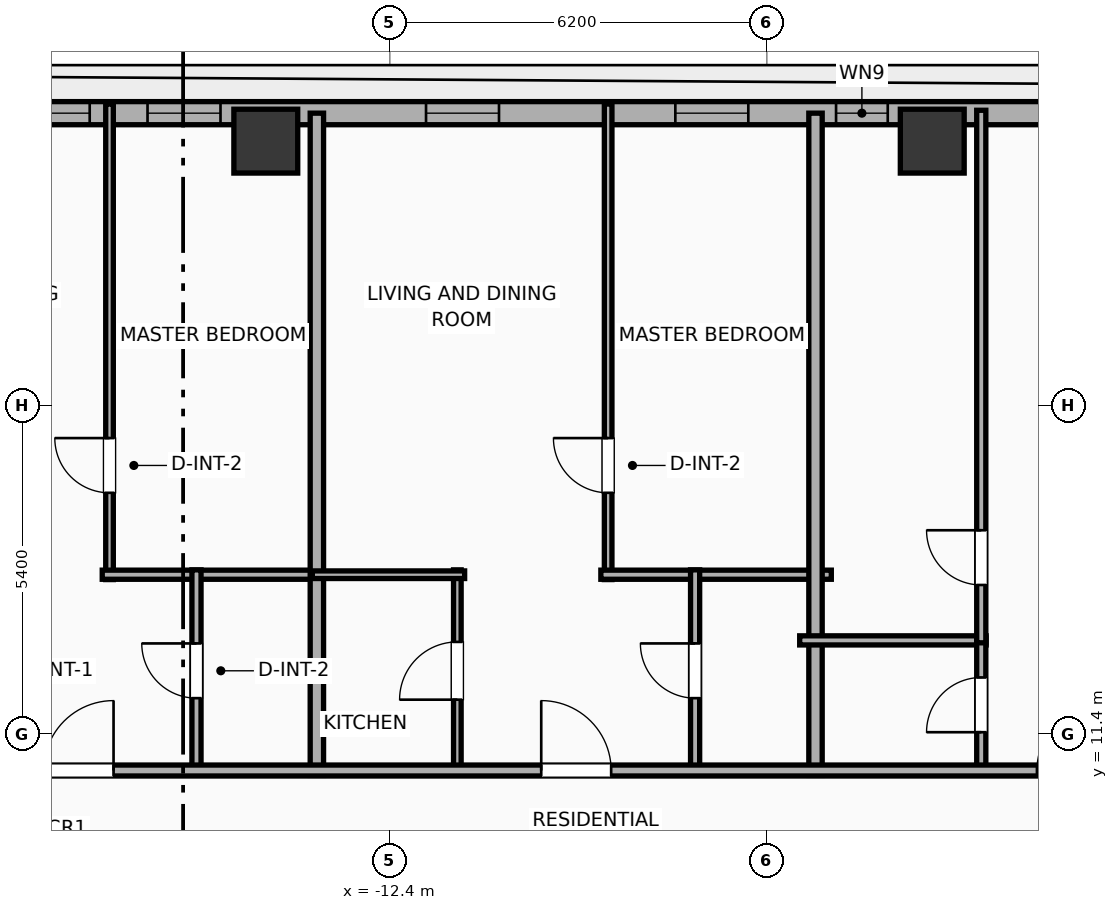
"""IFC4 building model, lengths in metres.
Left out: names, types, materials, properties, quantities, classifications, styles, units other than length and angle.
Written with IfcOpenShell. Run it as: python <this file> out.ifc"""

import sys

from ifc_helpers import new_model, si_unit, direction, frame, frame_2d, origin, origin_2d, place, context, subcontext, project, spatial, rectangle, hollow_rectangle, extrude, element, fill, save


model = new_model("IFC4")
c1 = context("Model", 3, precision=1e-05, world=origin(), true_north=direction((0.0, 1.0)))
c2 = subcontext(c1, "Body", "Model", "MODEL_VIEW")
j1 = project(units=[si_unit("LENGTHUNIT", "METRE"), si_unit("PLANEANGLEUNIT", "RADIAN")], contexts=[c1])
p1 = place(None, origin())
s1 = spatial("IfcSite", under=j1, at=p1, CompositionType="ELEMENT")
p2 = place(p1, origin())
s2 = spatial("IfcBuilding", under=s1, at=p2, CompositionType="ELEMENT")
p3 = place(p2, frame((0.0, 0.0, 85.8)))
s3 = spatial("IfcBuildingStorey", under=s2, at=p3, CompositionType="ELEMENT", Elevation=85.8)
for number, where, z_axis, x_axis in (
    (1, (-3.48, 21.15, -0.4), (0.0, 0.0, 1.0), (1.0, 0.0, 0.0)),
    (2, (-14.44, 21.15, -0.4), (0.0, 0.0, 1.0), (1.0, 0.0, 0.0)),
):
    element("IfcColumn", number, at=place(p3, frame(where, z_axis=z_axis, x_axis=x_axis)), inside=s3, PredefinedType="COLUMN", context=c2, shape_type="SweptSolid", body=[
        extrude(hollow_rectangle(XDim=1.05, YDim=1.05, WallThickness=0.036, at=origin_2d()), origin(), (0.0, 0.0, 1.0), 4.3),
    ])
p4 = place(p3, frame((-25.381, 21.61, 0.0), z_axis=(0.0, 0.0, 1.0), x_axis=(1.0, 0.0, 0.0)))
e3 = element("IfcWall", 3, at=p4, inside=s3, PredefinedType="ELEMENTEDWALL", context=c2, shape_type="SweptSolid", body=[
    extrude(rectangle(XDim=54.763, YDim=0.38, at=frame_2d((27.381, 0.0))), origin(), (0.0, 0.0, 1.0), 2.54),
])
p5 = place(p4, frame((5.645, 0.0, 0.75)))
e4 = element("IfcOpeningElement", 4, at=p5, cuts=e3, PredefinedType="OPENING", context=c2, shape_type="SweptSolid", body=[
    extrude(rectangle(XDim=2.4, YDim=1.45, at=frame_2d((1.2, 0.725))), frame((0.0, 0.2, 0.0), z_axis=(0.0, -1.0, 0.0), x_axis=(1.0, 0.0, 0.0)), (0.0, 0.0, 1.0), 0.4),
])
p6 = place(p4, frame((47.567, 0.0, 0.75)))
e5 = element("IfcOpeningElement", 5, at=p6, cuts=e3, PredefinedType="OPENING", context=c2, shape_type="SweptSolid", body=[
    extrude(rectangle(XDim=2.4, YDim=1.45, at=frame_2d((1.2, 0.725))), frame((0.0, 0.2, 0.0), z_axis=(0.0, -1.0, 0.0), x_axis=(1.0, 0.0, 0.0)), (0.0, 0.0, 1.0), 0.4),
])
p7 = place(p4, frame((1.635, 0.0, 0.55)))
e6 = element("IfcOpeningElement", 6, at=p7, cuts=e3, PredefinedType="OPENING", context=c2, shape_type="SweptSolid", body=[
    extrude(rectangle(XDim=1.2, YDim=1.15, at=frame_2d((0.6, 0.575))), frame((0.0, 0.2, 0.0), z_axis=(0.0, -1.0, 0.0), x_axis=(1.0, 0.0, 0.0)), (0.0, 0.0, 1.0), 0.4),
])
p8 = place(p4, frame((8.996, 0.0, 0.55)))
e7 = element("IfcOpeningElement", 7, at=p8, cuts=e3, PredefinedType="OPENING", context=c2, shape_type="SweptSolid", body=[
    extrude(rectangle(XDim=1.2, YDim=1.15, at=frame_2d((0.6, 0.575))), frame((0.0, 0.2, 0.0), z_axis=(0.0, -1.0, 0.0), x_axis=(1.0, 0.0, 0.0)), (0.0, 0.0, 1.0), 0.4),
])
p9 = place(p4, frame((13.576, 0.0, 0.55)))
e8 = element("IfcOpeningElement", 8, at=p9, cuts=e3, PredefinedType="OPENING", context=c2, shape_type="SweptSolid", body=[
    extrude(rectangle(XDim=1.2, YDim=1.15, at=frame_2d((0.6, 0.575))), frame((0.0, 0.2, 0.0), z_axis=(0.0, -1.0, 0.0), x_axis=(1.0, 0.0, 0.0)), (0.0, 0.0, 1.0), 0.4),
])
p10 = place(p4, frame((17.676, 0.0, 0.55)))
e9 = element("IfcOpeningElement", 9, at=p10, cuts=e3, PredefinedType="OPENING", context=c2, shape_type="SweptSolid", body=[
    extrude(rectangle(XDim=1.2, YDim=1.15, at=frame_2d((0.6, 0.575))), frame((0.0, 0.2, 0.0), z_axis=(0.0, -1.0, 0.0), x_axis=(1.0, 0.0, 0.0)), (0.0, 0.0, 1.0), 0.4),
])
p11 = place(p4, frame((20.319, 0.0, 0.55)))
e10 = element("IfcOpeningElement", 10, at=p11, cuts=e3, PredefinedType="OPENING", context=c2, shape_type="SweptSolid", body=[
    extrude(rectangle(XDim=0.85, YDim=1.15, at=frame_2d((0.425, 0.575))), frame((0.0, 0.2, 0.0), z_axis=(0.0, -1.0, 0.0), x_axis=(1.0, 0.0, 0.0)), (0.0, 0.0, 1.0), 0.4),
])
p12 = place(p4, frame((24.844, 0.0, 0.55)))
e11 = element("IfcOpeningElement", 11, at=p12, cuts=e3, PredefinedType="OPENING", context=c2, shape_type="SweptSolid", body=[
    extrude(rectangle(XDim=1.2, YDim=1.15, at=frame_2d((0.6, 0.575))), frame((0.0, 0.2, 0.0), z_axis=(0.0, -1.0, 0.0), x_axis=(1.0, 0.0, 0.0)), (0.0, 0.0, 1.0), 0.4),
])
p13 = place(p4, frame((29.976, 0.0, 0.55)))
e12 = element("IfcOpeningElement", 12, at=p13, cuts=e3, PredefinedType="OPENING", context=c2, shape_type="SweptSolid", body=[
    extrude(rectangle(XDim=1.2, YDim=1.15, at=frame_2d((0.6, 0.575))), frame((0.0, 0.2, 0.0), z_axis=(0.0, -1.0, 0.0), x_axis=(1.0, 0.0, 0.0)), (0.0, 0.0, 1.0), 0.4),
])
p14 = place(p4, frame((34.076, 0.0, 0.55)))
e13 = element("IfcOpeningElement", 13, at=p14, cuts=e3, PredefinedType="OPENING", context=c2, shape_type="SweptSolid", body=[
    extrude(rectangle(XDim=1.2, YDim=1.15, at=frame_2d((0.6, 0.575))), frame((0.0, 0.2, 0.0), z_axis=(0.0, -1.0, 0.0), x_axis=(1.0, 0.0, 0.0)), (0.0, 0.0, 1.0), 0.4),
])
p15 = place(p4, frame((38.176, 0.0, 0.55)))
e14 = element("IfcOpeningElement", 14, at=p15, cuts=e3, PredefinedType="OPENING", context=c2, shape_type="SweptSolid", body=[
    extrude(rectangle(XDim=1.2, YDim=1.15, at=frame_2d((0.6, 0.575))), frame((0.0, 0.2, 0.0), z_axis=(0.0, -1.0, 0.0), x_axis=(1.0, 0.0, 0.0)), (0.0, 0.0, 1.0), 0.4),
])
p16 = place(p4, frame((41.796, 0.0, 0.55)))
e15 = element("IfcOpeningElement", 15, at=p16, cuts=e3, PredefinedType="OPENING", context=c2, shape_type="SweptSolid", body=[
    extrude(rectangle(XDim=1.2, YDim=1.15, at=frame_2d((0.6, 0.575))), frame((0.0, 0.2, 0.0), z_axis=(0.0, -1.0, 0.0), x_axis=(1.0, 0.0, 0.0)), (0.0, 0.0, 1.0), 0.4),
])
p17 = place(p4, frame((45.336, 0.0, 0.55)))
e16 = element("IfcOpeningElement", 16, at=p17, cuts=e3, PredefinedType="OPENING", context=c2, shape_type="SweptSolid", body=[
    extrude(rectangle(XDim=1.2, YDim=1.15, at=frame_2d((0.6, 0.575))), frame((0.0, 0.2, 0.0), z_axis=(0.0, -1.0, 0.0), x_axis=(1.0, 0.0, 0.0)), (0.0, 0.0, 1.0), 0.4),
])
p18 = place(p4, frame((53.022, 0.0, 0.55)))
e17 = element("IfcOpeningElement", 17, at=p18, cuts=e3, PredefinedType="OPENING", context=c2, shape_type="SweptSolid", body=[
    extrude(rectangle(XDim=0.85, YDim=1.15, at=frame_2d((0.425, 0.575))), frame((0.0, 0.2, 0.0), z_axis=(0.0, -1.0, 0.0), x_axis=(1.0, 0.0, 0.0)), (0.0, 0.0, 1.0), 0.4),
])
p19 = place(p3, frame((-17.01, 13.94, 0.0), z_axis=(0.0, 0.0, 1.0), x_axis=(0.0, 1.0, 0.0)))
e18 = element("IfcWall", 18, at=p19, inside=s3, PredefinedType="PARTITIONING", context=c2, shape_type="SweptSolid", body=[
    extrude(rectangle(XDim=7.82, YDim=0.125, at=frame_2d((3.91, 0.0))), origin(), (0.0, 0.0, 1.0), 3.65),
])
p20 = place(p19, frame((1.427, 0.0, 0.0)))
e19 = element("IfcOpeningElement", 19, at=p20, cuts=e18, PredefinedType="OPENING", context=c2, shape_type="SweptSolid", body=[
    extrude(rectangle(XDim=0.9, YDim=2.05, at=frame_2d((0.45, 1.025))), frame((0.0, 0.073, 0.0), z_axis=(0.0, -1.0, 0.0), x_axis=(1.0, 0.0, 0.0)), (0.0, 0.0, 1.0), 0.145),
])
p21 = place(p3, frame((-17.13, 14.02, 0.0), z_axis=(0.0, 0.0, 1.0), x_axis=(1.0, 0.0, 0.0)))
e20 = element("IfcWall", 20, at=p21, inside=s3, PredefinedType="PLUMBINGWALL", context=c2, shape_type="SweptSolid", body=[
    extrude(rectangle(XDim=3.605, YDim=0.15, at=frame_2d((1.802, 0.0))), origin(), (0.0, 0.0, 1.0), 3.65),
])
p22 = place(p3, frame((-15.58, 10.78, 0.0), z_axis=(0.0, 0.0, 1.0), x_axis=(0.0, 1.0, 0.0)))
e21 = element("IfcWall", 21, at=p22, inside=s3, PredefinedType="PLUMBINGWALL", context=c2, shape_type="SweptSolid", body=[
    extrude(rectangle(XDim=3.32, YDim=0.15, at=frame_2d((1.66, 0.0))), origin(), (0.0, 0.0, 1.0), 2.54),
])
p23 = place(p22, frame((1.21, 0.0, 0.0)))
e22 = element("IfcOpeningElement", 22, at=p23, cuts=e21, PredefinedType="OPENING", context=c2, shape_type="SweptSolid", body=[
    extrude(rectangle(XDim=0.9, YDim=2.05, at=frame_2d((0.45, 1.025))), frame((0.0, 0.085, 0.0), z_axis=(0.0, -1.0, 0.0), x_axis=(1.0, 0.0, 0.0)), (0.0, 0.0, 1.0), 0.17),
])
p24 = place(p3, frame((-13.6, 10.72, 0.0), z_axis=(0.0, 0.0, 1.0), x_axis=(0.0, 1.0, 0.0)))
e23 = element("IfcWall", 23, at=p24, inside=s3, PredefinedType="PARTITIONING", context=c2, shape_type="SweptSolid", body=[
    extrude(rectangle(XDim=10.89, YDim=0.22, at=frame_2d((5.445, 0.0))), origin(), (0.0, 0.0, 1.0), 3.65),
])
p25 = place(p3, frame((-8.81, 13.94, 0.0), z_axis=(0.0, 0.0, 1.0), x_axis=(0.0, 1.0, 0.0)))
e24 = element("IfcWall", 24, at=p25, inside=s3, PredefinedType="PARTITIONING", context=c2, shape_type="SweptSolid", body=[
    extrude(rectangle(XDim=7.82, YDim=0.125, at=frame_2d((3.91, 0.0))), origin(), (0.0, 0.0, 1.0), 3.65),
])
p26 = place(p25, frame((1.427, 0.0, 0.0)))
e25 = element("IfcOpeningElement", 25, at=p26, cuts=e24, PredefinedType="OPENING", context=c2, shape_type="SweptSolid", body=[
    extrude(rectangle(XDim=0.9, YDim=2.05, at=frame_2d((0.45, 1.025))), frame((0.0, 0.073, 0.0), z_axis=(0.0, -1.0, 0.0), x_axis=(1.0, 0.0, 0.0)), (0.0, 0.0, 1.0), 0.145),
])
p27 = place(p3, frame((-8.93, 14.02, 0.0), z_axis=(0.0, 0.0, 1.0), x_axis=(1.0, 0.0, 0.0)))
e26 = element("IfcWall", 26, at=p27, inside=s3, PredefinedType="PLUMBINGWALL", context=c2, shape_type="SweptSolid", body=[
    extrude(rectangle(XDim=3.79, YDim=0.15, at=frame_2d((1.895, 0.0))), origin(), (0.0, 0.0, 1.0), 3.65),
])
p28 = place(p3, frame((-11.29, 10.78, 0.0), z_axis=(0.0, 0.0, 1.0), x_axis=(0.0, 1.0, 0.0)))
e27 = element("IfcWall", 27, at=p28, inside=s3, PredefinedType="PARTITIONING", context=c2, shape_type="SweptSolid", body=[
    extrude(rectangle(XDim=3.32, YDim=0.125, at=frame_2d((1.66, 0.0))), origin(), (0.0, 0.0, 1.0), 3.65),
])
p29 = place(p28, frame((1.185, 0.0, 0.0)))
e28 = element("IfcOpeningElement", 28, at=p29, cuts=e27, PredefinedType="OPENING", context=c2, shape_type="SweptSolid", body=[
    extrude(rectangle(XDim=0.95, YDim=2.05, at=frame_2d((0.475, 1.025))), frame((0.0, 0.073, 0.0), z_axis=(0.0, -1.0, 0.0), x_axis=(1.0, 0.0, 0.0)), (0.0, 0.0, 1.0), 0.145),
])
p30 = place(p3, frame((-13.675, 14.02, 0.0), z_axis=(0.0, 0.0, 1.0), x_axis=(1.0, 0.0, 0.0)))
e29 = element("IfcWall", 29, at=p30, inside=s3, PredefinedType="PARTITIONING", context=c2, shape_type="SweptSolid", body=[
    extrude(rectangle(XDim=2.505, YDim=0.125, at=frame_2d((1.252, 0.0))), origin(), (0.0, 0.0, 1.0), 3.65),
])
p31 = place(p3, frame((-7.38, 10.78, 0.0), z_axis=(0.0, 0.0, 1.0), x_axis=(0.0, 1.0, 0.0)))
e30 = element("IfcWall", 30, at=p31, inside=s3, PredefinedType="PLUMBINGWALL", context=c2, shape_type="SweptSolid", body=[
    extrude(rectangle(XDim=3.32, YDim=0.15, at=frame_2d((1.66, 0.0))), origin(), (0.0, 0.0, 1.0), 3.65),
])
p32 = place(p31, frame((1.21, 0.0, 0.0)))
e31 = element("IfcOpeningElement", 31, at=p32, cuts=e30, PredefinedType="OPENING", context=c2, shape_type="SweptSolid", body=[
    extrude(rectangle(XDim=0.9, YDim=2.05, at=frame_2d((0.45, 1.025))), frame((0.0, 0.085, 0.0), z_axis=(0.0, -1.0, 0.0), x_axis=(1.0, 0.0, 0.0)), (0.0, 0.0, 1.0), 0.17),
])
p33 = place(p3, frame((-5.4, 10.72, 0.0), z_axis=(0.0, 0.0, 1.0), x_axis=(0.0, 1.0, 0.0)))
e32 = element("IfcWall", 32, at=p33, inside=s3, PredefinedType="PARTITIONING", context=c2, shape_type="SweptSolid", body=[
    extrude(rectangle(XDim=10.89, YDim=0.22, at=frame_2d((5.445, 0.0))), origin(), (0.0, 0.0, 1.0), 3.65),
])
p34 = place(p3, frame((-5.66, 12.94, 0.0), z_axis=(0.0, 0.0, 1.0), x_axis=(1.0, 0.0, 0.0)))
e33 = element("IfcWall", 33, at=p34, inside=s3, PredefinedType="PLUMBINGWALL", context=c2, shape_type="SweptSolid", body=[
    extrude(rectangle(XDim=3.066, YDim=0.15, at=frame_2d((1.533, 0.0))), origin(), (0.0, 0.0, 1.0), 3.65),
])
p35 = place(p3, frame((-2.674, 10.78, 0.0), z_axis=(0.0, 0.0, 1.0), x_axis=(0.0, 1.0, 0.0)))
e34 = element("IfcWall", 34, at=p35, inside=s3, PredefinedType="PLUMBINGWALL", context=c2, shape_type="SweptSolid", body=[
    extrude(rectangle(XDim=2.2, YDim=0.15, at=frame_2d((1.1, 0.0))), origin(), (0.0, 0.0, 1.0), 3.65),
])
p36 = place(p35, frame((0.65, 0.0, 0.0)))
e35 = element("IfcOpeningElement", 35, at=p36, cuts=e34, PredefinedType="OPENING", context=c2, shape_type="SweptSolid", body=[
    extrude(rectangle(XDim=0.9, YDim=2.05, at=frame_2d((0.45, 1.025))), frame((0.0, 0.085, 0.0), z_axis=(0.0, -1.0, 0.0), x_axis=(1.0, 0.0, 0.0)), (0.0, 0.0, 1.0), 0.17),
])
p37 = place(p3, frame((-2.674, 12.9, 0.0), z_axis=(0.0, 0.0, 1.0), x_axis=(0.0, 1.0, 0.0)))
e36 = element("IfcWall", 36, at=p37, inside=s3, PredefinedType="PLUMBINGWALL", context=c2, shape_type="SweptSolid", body=[
    extrude(rectangle(XDim=8.758, YDim=0.15, at=frame_2d((4.379, 0.0))), origin(), (0.0, 0.0, 1.0), 3.65),
])
p38 = place(p37, frame((0.951, 0.0, 0.0)))
e37 = element("IfcOpeningElement", 37, at=p38, cuts=e36, PredefinedType="OPENING", context=c2, shape_type="SweptSolid", body=[
    extrude(rectangle(XDim=0.9, YDim=2.05, at=frame_2d((0.45, 1.025))), frame((0.0, 0.085, 0.0), z_axis=(0.0, -1.0, 0.0), x_axis=(1.0, 0.0, 0.0)), (0.0, 0.0, 1.0), 0.17),
])
p39 = place(p3, frame((-29.21, 10.8, 0.0), z_axis=(0.0, 0.0, 1.0), x_axis=(1.0, 0.0, 0.0)))
e38 = element("IfcWall", 38, at=p39, inside=s3, PredefinedType="PARTITIONING", context=c2, shape_type="SweptSolid", body=[
    extrude(rectangle(XDim=62.42, YDim=0.18, at=frame_2d((31.21, 0.0))), origin(), (0.0, 0.0, 1.0), 3.65),
])
p40 = place(p39, frame((3.264, 0.0, 0.0)))
e39 = element("IfcOpeningElement", 39, at=p40, cuts=e38, PredefinedType="OPENING", context=c2, shape_type="SweptSolid", body=[
    extrude(rectangle(XDim=1.15, YDim=2.05, at=frame_2d((0.575, 1.025))), frame((0.0, 0.1, 0.0), z_axis=(0.0, -1.0, 0.0), x_axis=(1.0, 0.0, 0.0)), (0.0, 0.0, 1.0), 0.2),
])
p41 = place(p39, frame((11.116, 0.0, 0.0)))
e40 = element("IfcOpeningElement", 40, at=p41, cuts=e38, PredefinedType="OPENING", context=c2, shape_type="SweptSolid", body=[
    extrude(rectangle(XDim=1.15, YDim=2.05, at=frame_2d((0.575, 1.025))), frame((0.0, 0.1, 0.0), z_axis=(0.0, -1.0, 0.0), x_axis=(1.0, 0.0, 0.0)), (0.0, 0.0, 1.0), 0.2),
])
p42 = place(p39, frame((19.3, 0.0, 0.0)))
e41 = element("IfcOpeningElement", 41, at=p42, cuts=e38, PredefinedType="OPENING", context=c2, shape_type="SweptSolid", body=[
    extrude(rectangle(XDim=1.15, YDim=2.05, at=frame_2d((0.575, 1.025))), frame((0.0, 0.1, 0.0), z_axis=(0.0, -1.0, 0.0), x_axis=(1.0, 0.0, 0.0)), (0.0, 0.0, 1.0), 0.2),
])
p43 = place(p39, frame((27.452, 0.0, 0.0)))
e42 = element("IfcOpeningElement", 42, at=p43, cuts=e38, PredefinedType="OPENING", context=c2, shape_type="SweptSolid", body=[
    extrude(rectangle(XDim=1.15, YDim=2.05, at=frame_2d((0.575, 1.025))), frame((0.0, 0.1, 0.0), z_axis=(0.0, -1.0, 0.0), x_axis=(1.0, 0.0, 0.0)), (0.0, 0.0, 1.0), 0.2),
])
p44 = place(p39, frame((35.697, 0.0, 0.0)))
e43 = element("IfcOpeningElement", 43, at=p44, cuts=e38, PredefinedType="OPENING", context=c2, shape_type="SweptSolid", body=[
    extrude(rectangle(XDim=1.15, YDim=2.05, at=frame_2d((0.575, 1.025))), frame((0.0, 0.1, 0.0), z_axis=(0.0, -1.0, 0.0), x_axis=(1.0, 0.0, 0.0)), (0.0, 0.0, 1.0), 0.2),
])
p45 = place(p39, frame((43.899, 0.0, 0.0)))
e44 = element("IfcOpeningElement", 44, at=p45, cuts=e38, PredefinedType="OPENING", context=c2, shape_type="SweptSolid", body=[
    extrude(rectangle(XDim=1.15, YDim=2.05, at=frame_2d((0.575, 1.025))), frame((0.0, 0.1, 0.0), z_axis=(0.0, -1.0, 0.0), x_axis=(1.0, 0.0, 0.0)), (0.0, 0.0, 1.0), 0.2),
])
p46 = place(p39, frame((51.599, 0.0, 0.0)))
e45 = element("IfcOpeningElement", 45, at=p46, cuts=e38, PredefinedType="OPENING", context=c2, shape_type="SweptSolid", body=[
    extrude(rectangle(XDim=1.15, YDim=2.05, at=frame_2d((0.575, 1.025))), frame((0.0, 0.1, 0.0), z_axis=(0.0, -1.0, 0.0), x_axis=(1.0, 0.0, 0.0)), (0.0, 0.0, 1.0), 0.2),
])
p47 = place(p39, frame((59.242, 0.0, 0.0)))
e46 = element("IfcOpeningElement", 46, at=p47, cuts=e38, PredefinedType="OPENING", context=c2, shape_type="SweptSolid", body=[
    extrude(rectangle(XDim=0.9, YDim=2.05, at=frame_2d((0.45, 1.025))), frame((0.0, 0.1, 0.0), z_axis=(0.0, -1.0, 0.0), x_axis=(1.0, 0.0, 0.0)), (0.0, 0.0, 1.0), 0.2),
])
p48 = place(p5, origin())
e47 = element("IfcWindow", 47, at=p48, inside=s3, PartitioningType="SINGLE_PANEL", PredefinedType="WINDOW", context=c2, shape_type="SweptSolid", body=[
    extrude(rectangle(XDim=2.4, YDim=1.45, at=frame_2d((1.2, 0.725))), frame((0.0, 0.03, 0.0), z_axis=(0.0, -1.0, 0.0), x_axis=(1.0, 0.0, 0.0)), (0.0, 0.0, 1.0), 0.06),
])
fill(e4, e47)
p49 = place(p8, origin())
e48 = element("IfcWindow", 48, at=p49, inside=s3, PartitioningType="SINGLE_PANEL", PredefinedType="WINDOW", context=c2, shape_type="SweptSolid", body=[
    extrude(rectangle(XDim=1.2, YDim=1.15, at=frame_2d((0.6, 0.575))), frame((0.0, 0.03, 0.0), z_axis=(0.0, -1.0, 0.0), x_axis=(1.0, 0.0, 0.0)), (0.0, 0.0, 1.0), 0.06),
])
fill(e7, e48)
p50 = place(p9, origin())
e49 = element("IfcWindow", 49, at=p50, inside=s3, PartitioningType="SINGLE_PANEL", PredefinedType="WINDOW", context=c2, shape_type="SweptSolid", body=[
    extrude(rectangle(XDim=1.2, YDim=1.15, at=frame_2d((0.6, 0.575))), frame((0.0, 0.03, 0.0), z_axis=(0.0, -1.0, 0.0), x_axis=(1.0, 0.0, 0.0)), (0.0, 0.0, 1.0), 0.06),
])
fill(e8, e49)
p51 = place(p10, origin())
e50 = element("IfcWindow", 50, at=p51, inside=s3, PartitioningType="SINGLE_PANEL", PredefinedType="WINDOW", context=c2, shape_type="SweptSolid", body=[
    extrude(rectangle(XDim=1.2, YDim=1.15, at=frame_2d((0.6, 0.575))), frame((0.0, 0.03, 0.0), z_axis=(0.0, -1.0, 0.0), x_axis=(1.0, 0.0, 0.0)), (0.0, 0.0, 1.0), 0.06),
])
fill(e9, e50)
p52 = place(p11, origin())
e51 = element("IfcWindow", 51, at=p52, inside=s3, PartitioningType="SINGLE_PANEL", PredefinedType="WINDOW", context=c2, shape_type="SweptSolid", body=[
    extrude(rectangle(XDim=0.85, YDim=1.15, at=frame_2d((0.425, 0.575))), frame((0.0, 0.03, 0.0), z_axis=(0.0, -1.0, 0.0), x_axis=(1.0, 0.0, 0.0)), (0.0, 0.0, 1.0), 0.06),
])
fill(e10, e51)
p53 = place(p20, origin())
e52 = element("IfcDoor", 52, at=p53, inside=s3, OperationType="SINGLE_SWING_RIGHT", PredefinedType="DOOR", context=c2, shape_type="SweptSolid", body=[
    extrude(rectangle(XDim=0.9, YDim=2.05, at=frame_2d((0.45, 1.025))), frame((0.0, 0.025, 0.0), z_axis=(0.0, -1.0, 0.0), x_axis=(1.0, 0.0, 0.0)), (0.0, 0.0, 1.0), 0.05),
])
fill(e19, e52)
p54 = place(p23, origin())
e53 = element("IfcDoor", 53, at=p54, inside=s3, OperationType="SINGLE_SWING_RIGHT", PredefinedType="DOOR", context=c2, shape_type="SweptSolid", body=[
    extrude(rectangle(XDim=0.9, YDim=2.05, at=frame_2d((0.45, 1.025))), frame((0.0, 0.025, 0.0), z_axis=(0.0, -1.0, 0.0), x_axis=(1.0, 0.0, 0.0)), (0.0, 0.0, 1.0), 0.05),
])
fill(e22, e53)
p55 = place(p26, origin())
e54 = element("IfcDoor", 54, at=p55, inside=s3, OperationType="SINGLE_SWING_RIGHT", PredefinedType="DOOR", context=c2, shape_type="SweptSolid", body=[
    extrude(rectangle(XDim=0.9, YDim=2.05, at=frame_2d((0.45, 1.025))), frame((0.0, 0.025, 0.0), z_axis=(0.0, -1.0, 0.0), x_axis=(1.0, 0.0, 0.0)), (0.0, 0.0, 1.0), 0.05),
])
fill(e25, e54)
p56 = place(p29, origin())
e55 = element("IfcDoor", 55, at=p56, inside=s3, OperationType="SINGLE_SWING_LEFT", PredefinedType="DOOR", context=c2, shape_type="SweptSolid", body=[
    extrude(rectangle(XDim=0.95, YDim=2.05, at=frame_2d((0.475, 1.025))), frame((0.0, 0.025, 0.0), z_axis=(0.0, -1.0, 0.0), x_axis=(1.0, 0.0, 0.0)), (0.0, 0.0, 1.0), 0.05),
])
fill(e28, e55)
p57 = place(p32, origin())
e56 = element("IfcDoor", 56, at=p57, inside=s3, OperationType="SINGLE_SWING_RIGHT", PredefinedType="DOOR", context=c2, shape_type="SweptSolid", body=[
    extrude(rectangle(XDim=0.9, YDim=2.05, at=frame_2d((0.45, 1.025))), frame((0.0, 0.025, 0.0), z_axis=(0.0, -1.0, 0.0), x_axis=(1.0, 0.0, 0.0)), (0.0, 0.0, 1.0), 0.05),
])
fill(e31, e56)
p58 = place(p36, origin())
e57 = element("IfcDoor", 57, at=p58, inside=s3, OperationType="SINGLE_SWING_LEFT", PredefinedType="DOOR", context=c2, shape_type="SweptSolid", body=[
    extrude(rectangle(XDim=0.9, YDim=2.05, at=frame_2d((0.45, 1.025))), frame((0.0, 0.025, 0.0), z_axis=(0.0, -1.0, 0.0), x_axis=(1.0, 0.0, 0.0)), (0.0, 0.0, 1.0), 0.05),
])
fill(e35, e57)
p59 = place(p38, origin())
e58 = element("IfcDoor", 58, at=p59, inside=s3, OperationType="SINGLE_SWING_RIGHT", PredefinedType="DOOR", context=c2, shape_type="SweptSolid", body=[
    extrude(rectangle(XDim=0.9, YDim=2.05, at=frame_2d((0.45, 1.025))), frame((0.0, 0.025, 0.0), z_axis=(0.0, -1.0, 0.0), x_axis=(1.0, 0.0, 0.0)), (0.0, 0.0, 1.0), 0.05),
])
fill(e37, e58)
p60 = place(p41, origin())
e59 = element("IfcDoor", 59, at=p60, inside=s3, OperationType="SINGLE_SWING_RIGHT", PredefinedType="DOOR", context=c2, shape_type="SweptSolid", body=[
    extrude(rectangle(XDim=1.15, YDim=2.05, at=frame_2d((0.575, 1.025))), frame((0.0, 0.025, 0.0), z_axis=(0.0, -1.0, 0.0), x_axis=(1.0, 0.0, 0.0)), (0.0, 0.0, 1.0), 0.05),
])
fill(e40, e59)
p61 = place(p42, origin())
e60 = element("IfcDoor", 60, at=p61, inside=s3, OperationType="SINGLE_SWING_LEFT", PredefinedType="DOOR", context=c2, shape_type="SweptSolid", body=[
    extrude(rectangle(XDim=1.15, YDim=2.05, at=frame_2d((0.575, 1.025))), frame((0.0, 0.025, 0.0), z_axis=(0.0, -1.0, 0.0), x_axis=(1.0, 0.0, 0.0)), (0.0, 0.0, 1.0), 0.05),
])
fill(e41, e60)
p62 = place(p43, origin())
e61 = element("IfcDoor", 61, at=p62, inside=s3, OperationType="SINGLE_SWING_RIGHT", PredefinedType="DOOR", context=c2, shape_type="SweptSolid", body=[
    extrude(rectangle(XDim=1.15, YDim=2.05, at=frame_2d((0.575, 1.025))), frame((0.0, 0.025, 0.0), z_axis=(0.0, -1.0, 0.0), x_axis=(1.0, 0.0, 0.0)), (0.0, 0.0, 1.0), 0.05),
])
fill(e42, e61)
save(model, sys.argv[1])
